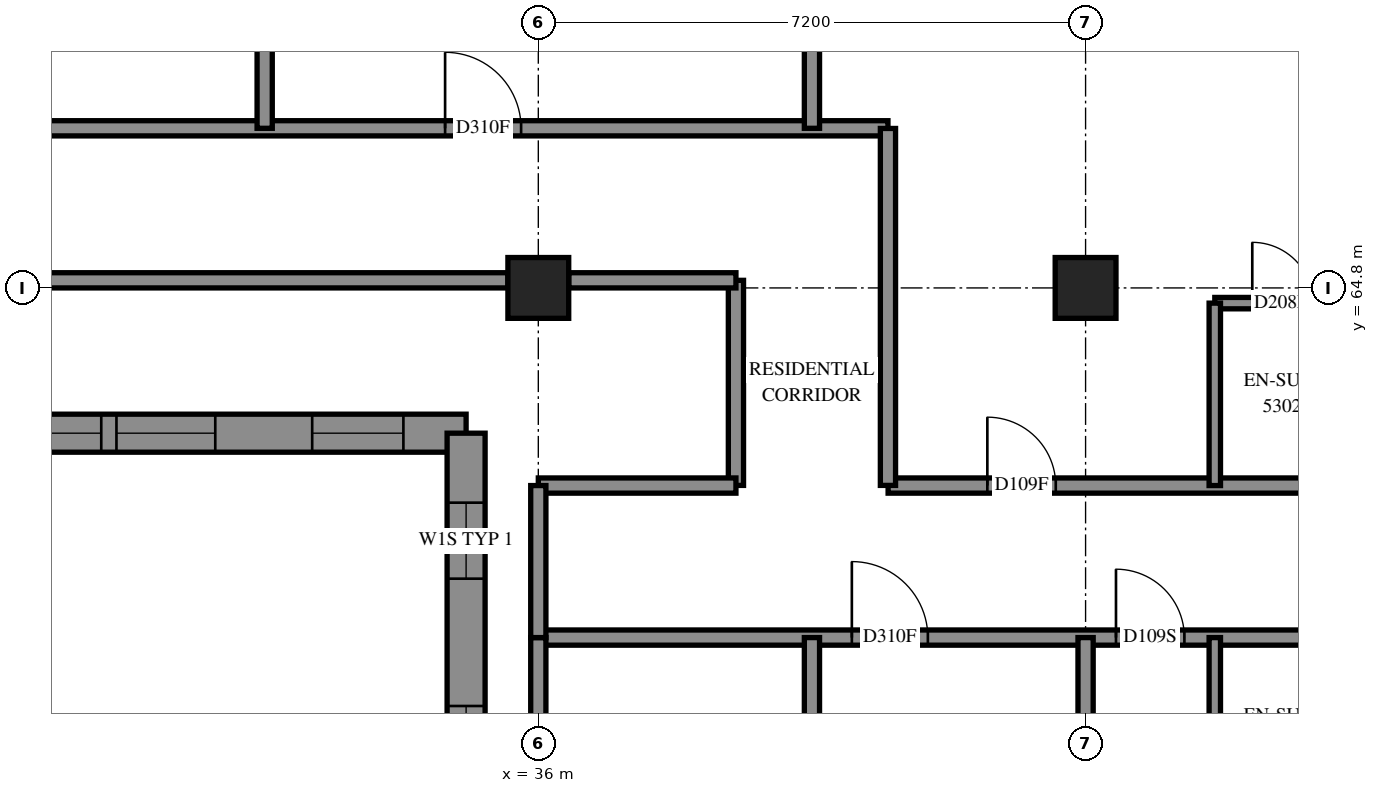
"""IFC4 building model, lengths in metres.
Left out: names, types, materials, properties, quantities, classifications, styles, units other than length and angle.
Written with IfcOpenShell. Run it as: python <this file> out.ifc"""

import sys

from ifc_helpers import new_model, si_unit, direction, frame, frame_2d, origin, origin_2d, place, context, subcontext, project, spatial, polyline, rectangle, outline, extrude, element, fill, save


model = new_model("IFC4")
c1 = context("Model", 3, precision=1e-05, world=origin(), true_north=direction((0.0, 1.0)))
c2 = subcontext(c1, "Body", "Model", "MODEL_VIEW")
j1 = project(units=[si_unit("LENGTHUNIT", "METRE"), si_unit("PLANEANGLEUNIT", "RADIAN")], contexts=[c1])
p1 = place(None, origin())
s1 = spatial("IfcSite", under=j1, at=p1, CompositionType="ELEMENT")
p2 = place(p1, origin())
s2 = spatial("IfcBuilding", under=s1, at=p2, CompositionType="ELEMENT")
p3 = place(p2, frame((0.0, 0.0, 196.4)))
s3 = spatial("IfcBuildingStorey", under=s2, at=p3, CompositionType="ELEMENT", Elevation=196.4)
for number, where, z_axis, x_axis in (
    (1, (36.0, 64.8, 0.0), (0.0, 0.0, 1.0), (1.0, 0.0, 0.0)),
    (2, (43.2, 64.8, 0.0), (0.0, 0.0, 1.0), (1.0, 0.0, 0.0)),
):
    element("IfcColumn", number, at=place(p3, frame(where, z_axis=z_axis, x_axis=x_axis)), inside=s3, PredefinedType="COLUMN", context=c2, shape_type="SweptSolid", body=[
        extrude(rectangle(XDim=0.8, YDim=0.8, at=origin_2d()), origin(), (0.0, 0.0, 1.0), 3.1),
    ])
p4 = place(p3, frame((19.689, 62.889, 0.0), z_axis=(0.0, 0.0, 1.0), x_axis=(1.0, 0.0, 0.0)))
e3 = element("IfcWall", 3, at=p4, inside=s3, PredefinedType="SOLIDWALL", context=c2, shape_type="SweptSolid", body=[
    extrude(outline(polyline([(-0.25, -0.25), (15.111, -0.25), (15.611, 0.25), (0.25, 0.25), (-0.25, -0.25)])), origin(), (0.0, 0.0, 1.0), 3.1),
])
p5 = place(p4, frame((2.311, 0.0, 0.45)))
e4 = element("IfcOpeningElement", 4, at=p5, cuts=e3, PredefinedType="OPENING", context=c2, shape_type="SweptSolid", body=[
    extrude(rectangle(XDim=1.3, YDim=2.5, at=frame_2d((0.65, 1.25))), frame((0.0, 0.26, 0.0), z_axis=(0.0, -1.0, 0.0), x_axis=(1.0, 0.0, 0.0)), (0.0, 0.0, 1.0), 0.52),
])
p6 = place(p4, frame((3.811, 0.0, 0.45)))
e5 = element("IfcOpeningElement", 5, at=p6, cuts=e3, PredefinedType="OPENING", context=c2, shape_type="SweptSolid", body=[
    extrude(rectangle(XDim=1.3, YDim=2.5, at=frame_2d((0.65, 1.25))), frame((0.0, 0.26, 0.0), z_axis=(0.0, -1.0, 0.0), x_axis=(1.0, 0.0, 0.0)), (0.0, 0.0, 1.0), 0.52),
])
p7 = place(p4, frame((5.911, 0.0, 0.45)))
e6 = element("IfcOpeningElement", 6, at=p7, cuts=e3, PredefinedType="OPENING", context=c2, shape_type="SweptSolid", body=[
    extrude(rectangle(XDim=1.3, YDim=2.5, at=frame_2d((0.65, 1.25))), frame((0.0, 0.26, 0.0), z_axis=(0.0, -1.0, 0.0), x_axis=(1.0, 0.0, 0.0)), (0.0, 0.0, 1.0), 0.52),
])
p8 = place(p4, frame((7.411, 0.0, 0.45)))
e7 = element("IfcOpeningElement", 7, at=p8, cuts=e3, PredefinedType="OPENING", context=c2, shape_type="SweptSolid", body=[
    extrude(rectangle(XDim=1.3, YDim=2.5, at=frame_2d((0.65, 1.25))), frame((0.0, 0.26, 0.0), z_axis=(0.0, -1.0, 0.0), x_axis=(1.0, 0.0, 0.0)), (0.0, 0.0, 1.0), 0.52),
])
p9 = place(p4, frame((9.261, 0.0, 0.45)))
e8 = element("IfcOpeningElement", 8, at=p9, cuts=e3, PredefinedType="OPENING", context=c2, shape_type="SweptSolid", body=[
    extrude(rectangle(XDim=1.3, YDim=2.5, at=frame_2d((0.65, 1.25))), frame((0.0, 0.26, 0.0), z_axis=(0.0, -1.0, 0.0), x_axis=(1.0, 0.0, 0.0)), (0.0, 0.0, 1.0), 0.52),
])
p10 = place(p4, frame((10.761, 0.0, 0.45)))
e9 = element("IfcOpeningElement", 9, at=p10, cuts=e3, PredefinedType="OPENING", context=c2, shape_type="SweptSolid", body=[
    extrude(rectangle(XDim=1.3, YDim=2.5, at=frame_2d((0.65, 1.25))), frame((0.0, 0.26, 0.0), z_axis=(0.0, -1.0, 0.0), x_axis=(1.0, 0.0, 0.0)), (0.0, 0.0, 1.0), 0.52),
])
p11 = place(p4, frame((0.581, 0.0, 0.45)))
e10 = element("IfcOpeningElement", 10, at=p11, cuts=e3, PredefinedType="OPENING", context=c2, shape_type="SweptSolid", body=[
    extrude(rectangle(XDim=1.2, YDim=2.5, at=frame_2d((0.6, 1.25))), frame((0.0, 0.26, 0.0), z_axis=(0.0, -1.0, 0.0), x_axis=(1.0, 0.0, 0.0)), (0.0, 0.0, 1.0), 0.52),
])
p12 = place(p4, frame((13.336, 0.0, 0.45)))
e11 = element("IfcOpeningElement", 11, at=p12, cuts=e3, PredefinedType="OPENING", context=c2, shape_type="SweptSolid", body=[
    extrude(rectangle(XDim=1.2, YDim=2.5, at=frame_2d((0.6, 1.25))), frame((0.0, 0.26, 0.0), z_axis=(0.0, -1.0, 0.0), x_axis=(1.0, 0.0, 0.0)), (0.0, 0.0, 1.0), 0.52),
])
p13 = place(p3, frame((35.05, 62.889, 0.0), z_axis=(0.0, 0.0, 1.0), x_axis=(0.0, -1.0, 0.0)))
e12 = element("IfcWall", 12, at=p13, inside=s3, PredefinedType="SOLIDWALL", context=c2, shape_type="SweptSolid", body=[
    extrude(outline(polyline([(0.25, -0.25), (6.489, -0.25), (5.989, 0.25), (-0.25, 0.25), (0.25, -0.25)])), origin(), (0.0, 0.0, 1.0), 3.1),
])
p14 = place(p13, frame((3.589, 0.0, 0.45)))
e13 = element("IfcOpeningElement", 13, at=p14, cuts=e12, PredefinedType="OPENING", context=c2, shape_type="SweptSolid", body=[
    extrude(rectangle(XDim=1.3, YDim=2.5, at=frame_2d((0.65, 1.25))), frame((0.0, 0.26, 0.0), z_axis=(0.0, -1.0, 0.0), x_axis=(1.0, 0.0, 0.0)), (0.0, 0.0, 1.0), 0.52),
])
p15 = place(p13, frame((0.914, 0.0, 0.45)))
e14 = element("IfcOpeningElement", 14, at=p15, cuts=e12, PredefinedType="OPENING", context=c2, shape_type="SweptSolid", body=[
    extrude(rectangle(XDim=1.0, YDim=2.5, at=frame_2d((0.5, 1.25))), frame((0.0, 0.26, 0.0), z_axis=(0.0, -1.0, 0.0), x_axis=(1.0, 0.0, 0.0)), (0.0, 0.0, 1.0), 0.52),
])
p16 = place(p3, frame((21.602, 66.9, 0.0), z_axis=(0.0, 0.0, 1.0), x_axis=(1.0, 0.0, 0.0)))
e15 = element("IfcWall", 15, at=p16, inside=s3, PredefinedType="PARTITIONING", context=c2, shape_type="SweptSolid", body=[
    extrude(rectangle(XDim=18.998, YDim=0.2, at=frame_2d((9.499, 0.0))), origin(), (0.0, 0.0, 1.0), 3.1),
])
p17 = place(p16, frame((5.972, 0.0, 0.0)))
e16 = element("IfcOpeningElement", 16, at=p17, cuts=e15, PredefinedType="OPENING", context=c2, shape_type="SweptSolid", body=[
    extrude(rectangle(XDim=1.0, YDim=2.1, at=frame_2d((0.5, 1.05))), frame((0.0, 0.11, 0.0), z_axis=(0.0, -1.0, 0.0), x_axis=(1.0, 0.0, 0.0)), (0.0, 0.0, 1.0), 0.22),
])
p18 = place(p16, frame((13.172, 0.0, 0.0)))
e17 = element("IfcOpeningElement", 17, at=p18, cuts=e15, PredefinedType="OPENING", context=c2, shape_type="SweptSolid", body=[
    extrude(rectangle(XDim=1.0, YDim=2.1, at=frame_2d((0.5, 1.05))), frame((0.0, 0.11, 0.0), z_axis=(0.0, -1.0, 0.0), x_axis=(1.0, 0.0, 0.0)), (0.0, 0.0, 1.0), 0.22),
])
p19 = place(p3, frame((36.0, 60.2, 0.0), z_axis=(0.0, 0.0, 1.0), x_axis=(1.0, 0.0, 0.0)))
e18 = element("IfcWall", 18, at=p19, inside=s3, PredefinedType="PARTITIONING", context=c2, shape_type="SweptSolid", body=[
    extrude(rectangle(XDim=17.0, YDim=0.2, at=frame_2d((8.5, 0.0))), origin(), (0.0, 0.0, 1.0), 3.1),
])
p20 = place(p19, frame((4.125, 0.0, 0.0)))
e19 = element("IfcOpeningElement", 19, at=p20, cuts=e18, PredefinedType="OPENING", context=c2, shape_type="SweptSolid", body=[
    extrude(rectangle(XDim=1.0, YDim=2.1, at=frame_2d((0.5, 1.05))), frame((0.0, 0.11, 0.0), z_axis=(0.0, -1.0, 0.0), x_axis=(1.0, 0.0, 0.0)), (0.0, 0.0, 1.0), 0.22),
])
p21 = place(p19, frame((7.6, 0.0, 0.0)))
e20 = element("IfcOpeningElement", 20, at=p21, cuts=e18, PredefinedType="OPENING", context=c2, shape_type="SweptSolid", body=[
    extrude(rectangle(XDim=0.9, YDim=2.1, at=frame_2d((0.45, 1.05))), frame((0.0, 0.11, 0.0), z_axis=(0.0, -1.0, 0.0), x_axis=(1.0, 0.0, 0.0)), (0.0, 0.0, 1.0), 0.22),
])
p22 = place(p19, frame((11.48, 0.0, 0.0)))
e21 = element("IfcOpeningElement", 21, at=p22, cuts=e18, PredefinedType="OPENING", context=c2, shape_type="SweptSolid", body=[
    extrude(rectangle(XDim=1.0, YDim=2.1, at=frame_2d((0.5, 1.05))), frame((0.0, 0.11, 0.0), z_axis=(0.0, -1.0, 0.0), x_axis=(1.0, 0.0, 0.0)), (0.0, 0.0, 1.0), 0.22),
])
p23 = place(p19, frame((15.805, 0.0, 0.0)))
e22 = element("IfcOpeningElement", 22, at=p23, cuts=e18, PredefinedType="OPENING", context=c2, shape_type="SweptSolid", body=[
    extrude(rectangle(XDim=1.0, YDim=2.1, at=frame_2d((0.5, 1.05))), frame((0.0, 0.11, 0.0), z_axis=(0.0, -1.0, 0.0), x_axis=(1.0, 0.0, 0.0)), (0.0, 0.0, 1.0), 0.22),
])
p24 = place(p3, frame((40.602, 62.2, 0.0), z_axis=(0.0, 0.0, 1.0), x_axis=(1.0, 0.0, 0.0)))
e23 = element("IfcWall", 23, at=p24, inside=s3, PredefinedType="PARTITIONING", context=c2, shape_type="SweptSolid", body=[
    extrude(rectangle(XDim=14.998, YDim=0.2, at=frame_2d((7.499, 0.0))), origin(), (0.0, 0.0, 1.0), 3.1),
])
p25 = place(p24, frame((1.306, 0.0, 0.0)))
e24 = element("IfcOpeningElement", 24, at=p25, cuts=e23, PredefinedType="OPENING", context=c2, shape_type="SweptSolid", body=[
    extrude(rectangle(XDim=0.9, YDim=2.1, at=frame_2d((0.45, 1.05))), frame((0.0, 0.11, 0.0), z_axis=(0.0, -1.0, 0.0), x_axis=(1.0, 0.0, 0.0)), (0.0, 0.0, 1.0), 0.22),
])
p26 = place(p24, frame((8.548, 0.0, 0.0)))
e25 = element("IfcOpeningElement", 25, at=p26, cuts=e23, PredefinedType="OPENING", context=c2, shape_type="SweptSolid", body=[
    extrude(rectangle(XDim=0.9, YDim=2.1, at=frame_2d((0.45, 1.05))), frame((0.0, 0.11, 0.0), z_axis=(0.0, -1.0, 0.0), x_axis=(1.0, 0.0, 0.0)), (0.0, 0.0, 1.0), 0.22),
])
p27 = place(p24, frame((10.198, 0.0, 0.0)))
e26 = element("IfcOpeningElement", 26, at=p27, cuts=e23, PredefinedType="OPENING", context=c2, shape_type="SweptSolid", body=[
    extrude(rectangle(XDim=0.9, YDim=2.1, at=frame_2d((0.45, 1.05))), frame((0.0, 0.11, 0.0), z_axis=(0.0, -1.0, 0.0), x_axis=(1.0, 0.0, 0.0)), (0.0, 0.0, 1.0), 0.22),
])
p28 = place(p24, frame((13.746, 0.0, 0.0)))
e27 = element("IfcOpeningElement", 27, at=p28, cuts=e23, PredefinedType="OPENING", context=c2, shape_type="SweptSolid", body=[
    extrude(rectangle(XDim=1.0, YDim=2.1, at=frame_2d((0.5, 1.05))), frame((0.0, 0.11, 0.0), z_axis=(0.0, -1.0, 0.0), x_axis=(1.0, 0.0, 0.0)), (0.0, 0.0, 1.0), 0.22),
])
p29 = place(p3, frame((29.2, 64.9, 0.0), z_axis=(0.0, 0.0, 1.0), x_axis=(1.0, 0.0, 0.0)))
e28 = element("IfcWall", 28, at=p29, inside=s3, PredefinedType="PARTITIONING", context=c2, shape_type="SweptSolid", body=[
    extrude(rectangle(XDim=6.4, YDim=0.2, at=frame_2d((3.2, 0.0))), origin(), (0.0, 0.0, 1.0), 2.6),
])
p30 = place(p3, frame((32.4, 66.9, 0.0), z_axis=(0.0, 0.0, 1.0), x_axis=(0.0, 1.0, 0.0)))
e29 = element("IfcWall", 29, at=p30, inside=s3, PredefinedType="PARTITIONING", context=c2, shape_type="SweptSolid", body=[
    extrude(rectangle(XDim=5.949, YDim=0.2, at=frame_2d((2.974, 0.0))), origin(), (0.0, 0.0, 1.0), 3.1),
])
p31 = place(p3, frame((39.6, 66.9, 0.0), z_axis=(0.0, 0.0, 1.0), x_axis=(0.0, 1.0, 0.0)))
e30 = element("IfcWall", 30, at=p31, inside=s3, PredefinedType="PARTITIONING", context=c2, shape_type="SweptSolid", body=[
    extrude(rectangle(XDim=5.913, YDim=0.2, at=frame_2d((2.956, 0.0))), origin(), (0.0, 0.0, 1.0), 3.1),
])
p32 = place(p3, frame((40.6, 62.202, 0.0), z_axis=(0.0, 0.0, 1.0), x_axis=(0.0, 1.0, 0.0)))
e31 = element("IfcWall", 31, at=p32, inside=s3, PredefinedType="PARTITIONING", context=c2, shape_type="SweptSolid", body=[
    extrude(rectangle(XDim=4.696, YDim=0.2, at=frame_2d((2.348, 0.0))), origin(), (0.0, 0.0, 1.0), 3.1),
])
p33 = place(p3, frame((44.9, 64.6, 0.0), z_axis=(0.0, 0.0, 1.0), x_axis=(1.0, 0.0, 0.0)))
e32 = element("IfcWall", 32, at=p33, inside=s3, PredefinedType="PARTITIONING", context=c2, shape_type="SweptSolid", body=[
    extrude(rectangle(XDim=3.8, YDim=0.15, at=frame_2d((1.9, 0.0))), origin(), (0.0, 0.0, 1.0), 3.1),
])
p34 = place(p33, frame((0.493, 0.0, 0.0)))
e33 = element("IfcOpeningElement", 33, at=p34, cuts=e32, PredefinedType="OPENING", context=c2, shape_type="SweptSolid", body=[
    extrude(rectangle(XDim=0.8, YDim=2.1, at=frame_2d((0.4, 1.05))), frame((0.0, 0.085, 0.0), z_axis=(0.0, -1.0, 0.0), x_axis=(1.0, 0.0, 0.0)), (0.0, 0.0, 1.0), 0.17),
])
p35 = place(p33, frame((2.507, 0.0, 0.0)))
e34 = element("IfcOpeningElement", 34, at=p35, cuts=e32, PredefinedType="OPENING", context=c2, shape_type="SweptSolid", body=[
    extrude(rectangle(XDim=0.8, YDim=2.1, at=frame_2d((0.4, 1.05))), frame((0.0, 0.085, 0.0), z_axis=(0.0, -1.0, 0.0), x_axis=(1.0, 0.0, 0.0)), (0.0, 0.0, 1.0), 0.17),
])
p36 = place(p3, frame((39.6, 56.9, 0.0), z_axis=(0.0, 0.0, 1.0), x_axis=(0.0, 1.0, 0.0)))
e35 = element("IfcWall", 35, at=p36, inside=s3, PredefinedType="PARTITIONING", context=c2, shape_type="SweptSolid", body=[
    extrude(rectangle(XDim=3.3, YDim=0.2, at=frame_2d((1.65, 0.0))), origin(), (0.0, 0.0, 1.0), 3.1),
])
p37 = place(p3, frame((38.6, 62.202, 0.0), z_axis=(0.0, 0.0, 1.0), x_axis=(0.0, 1.0, 0.0)))
e36 = element("IfcWall", 36, at=p37, inside=s3, PredefinedType="PARTITIONING", context=c2, shape_type="SweptSolid", body=[
    extrude(rectangle(XDim=2.698, YDim=0.2, at=frame_2d((1.349, 0.0))), origin(), (0.0, 0.0, 1.0), 3.1),
])
p38 = place(p3, frame((36.0, 62.2, 0.0), z_axis=(0.0, 0.0, 1.0), x_axis=(1.0, 0.0, 0.0)))
e37 = element("IfcWall", 37, at=p38, inside=s3, PredefinedType="PARTITIONING", context=c2, shape_type="SweptSolid", body=[
    extrude(rectangle(XDim=2.6, YDim=0.2, at=frame_2d((1.3, 0.0))), origin(), (0.0, 0.0, 1.0), 3.1),
])
for number, where, z_axis, x_axis in (
    (38, (44.9, 57.8, 0.0), (0.0, 0.0, 1.0), (0.0, 1.0, 0.0)),
    (39, (44.9, 62.2, 0.0), (0.0, 0.0, 1.0), (0.0, 1.0, 0.0)),
):
    element("IfcWall", number, at=place(p3, frame(where, z_axis=z_axis, x_axis=x_axis)), inside=s3, PredefinedType="PARTITIONING", context=c2, shape_type="SweptSolid", body=[
        extrude(rectangle(XDim=2.4, YDim=0.15, at=frame_2d((1.2, 0.0))), origin(), (0.0, 0.0, 1.0), 3.1),
    ])
p39 = place(p3, frame((36.4, 64.9, 0.0), z_axis=(0.0, 0.0, 1.0), x_axis=(1.0, 0.0, 0.0)))
e40 = element("IfcWall", 40, at=p39, inside=s3, PredefinedType="PARTITIONING", context=c2, shape_type="SweptSolid", body=[
    extrude(rectangle(XDim=2.2, YDim=0.2, at=frame_2d((1.1, 0.0))), origin(), (0.0, 0.0, 1.0), 3.1),
])
p40 = place(p3, frame((36.0, 58.0, 0.0), z_axis=(0.0, 0.0, 1.0), x_axis=(0.0, 1.0, 0.0)))
e41 = element("IfcWall", 41, at=p40, inside=s3, PredefinedType="PARTITIONING", context=c2, shape_type="SweptSolid", body=[
    extrude(rectangle(XDim=2.2, YDim=0.2, at=frame_2d((1.1, 0.0))), origin(), (0.0, 0.0, 1.0), 2.6),
])
p41 = place(p3, frame((43.2, 58.0, 0.0), z_axis=(0.0, 0.0, 1.0), x_axis=(0.0, 1.0, 0.0)))
e42 = element("IfcWall", 42, at=p41, inside=s3, PredefinedType="PARTITIONING", context=c2, shape_type="SweptSolid", body=[
    extrude(rectangle(XDim=2.2, YDim=0.2, at=frame_2d((1.1, 0.0))), origin(), (0.0, 0.0, 1.0), 3.1),
])
p42 = place(p3, frame((36.0, 60.2, 0.0), z_axis=(0.0, 0.0, 1.0), x_axis=(0.0, 1.0, 0.0)))
e43 = element("IfcWall", 43, at=p42, inside=s3, PredefinedType="PARTITIONING", context=c2, shape_type="SweptSolid", body=[
    extrude(rectangle(XDim=2.0, YDim=0.2, at=frame_2d((1.0, 0.0))), origin(), (0.0, 0.0, 1.0), 2.6),
])
p43 = place(p9, origin())
e44 = element("IfcWindow", 44, at=p43, inside=s3, PartitioningType="SINGLE_PANEL", PredefinedType="WINDOW", context=c2, shape_type="SweptSolid", body=[
    extrude(rectangle(XDim=1.3, YDim=2.5, at=frame_2d((0.65, 1.25))), frame((0.0, 0.18, 0.0), z_axis=(0.0, -1.0, 0.0), x_axis=(1.0, 0.0, 0.0)), (0.0, 0.0, 1.0), 0.06),
])
fill(e8, e44)
p44 = place(p10, origin())
e45 = element("IfcWindow", 45, at=p44, inside=s3, PartitioningType="SINGLE_PANEL", PredefinedType="WINDOW", context=c2, shape_type="SweptSolid", body=[
    extrude(rectangle(XDim=1.3, YDim=2.5, at=frame_2d((0.65, 1.25))), frame((0.0, 0.18, 0.0), z_axis=(0.0, -1.0, 0.0), x_axis=(1.0, 0.0, 0.0)), (0.0, 0.0, 1.0), 0.06),
])
fill(e9, e45)
p45 = place(p12, origin())
e46 = element("IfcWindow", 46, at=p45, inside=s3, PartitioningType="SINGLE_PANEL", PredefinedType="WINDOW", context=c2, shape_type="SweptSolid", body=[
    extrude(rectangle(XDim=1.2, YDim=2.5, at=frame_2d((0.6, 1.25))), frame((0.0, 0.18, 0.0), z_axis=(0.0, -1.0, 0.0), x_axis=(1.0, 0.0, 0.0)), (0.0, 0.0, 1.0), 0.06),
])
fill(e11, e46)
p46 = place(p14, origin())
e47 = element("IfcWindow", 47, at=p46, inside=s3, PartitioningType="SINGLE_PANEL", PredefinedType="WINDOW", context=c2, shape_type="SweptSolid", body=[
    extrude(rectangle(XDim=1.3, YDim=2.5, at=frame_2d((0.65, 1.25))), frame((0.0, 0.18, 0.0), z_axis=(0.0, -1.0, 0.0), x_axis=(1.0, 0.0, 0.0)), (0.0, 0.0, 1.0), 0.06),
])
fill(e13, e47)
p47 = place(p18, origin())
e48 = element("IfcDoor", 48, at=p47, inside=s3, OperationType="SINGLE_SWING_LEFT", PredefinedType="DOOR", context=c2, shape_type="SweptSolid", body=[
    extrude(rectangle(XDim=1.0, YDim=2.1, at=frame_2d((0.5, 1.05))), frame((0.0, 0.025, 0.0), z_axis=(0.0, -1.0, 0.0), x_axis=(1.0, 0.0, 0.0)), (0.0, 0.0, 1.0), 0.05),
])
fill(e17, e48)
p48 = place(p20, origin())
e49 = element("IfcDoor", 49, at=p48, inside=s3, OperationType="SINGLE_SWING_RIGHT", PredefinedType="DOOR", context=c2, shape_type="SweptSolid", body=[
    extrude(rectangle(XDim=1.0, YDim=2.1, at=frame_2d((0.5, 1.05))), frame((0.0, 0.025, 0.0), z_axis=(0.0, -1.0, 0.0), x_axis=(1.0, 0.0, 0.0)), (0.0, 0.0, 1.0), 0.05),
])
fill(e19, e49)
p49 = place(p21, origin())
e50 = element("IfcDoor", 50, at=p49, inside=s3, OperationType="SINGLE_SWING_LEFT", PredefinedType="DOOR", context=c2, shape_type="SweptSolid", body=[
    extrude(rectangle(XDim=0.9, YDim=2.1, at=frame_2d((0.45, 1.05))), frame((0.0, 0.025, 0.0), z_axis=(0.0, -1.0, 0.0), x_axis=(1.0, 0.0, 0.0)), (0.0, 0.0, 1.0), 0.05),
])
fill(e20, e50)
p50 = place(p25, origin())
e51 = element("IfcDoor", 51, at=p50, inside=s3, OperationType="SINGLE_SWING_LEFT", PredefinedType="DOOR", context=c2, shape_type="SweptSolid", body=[
    extrude(rectangle(XDim=0.9, YDim=2.1, at=frame_2d((0.45, 1.05))), frame((0.0, 0.025, 0.0), z_axis=(0.0, -1.0, 0.0), x_axis=(1.0, 0.0, 0.0)), (0.0, 0.0, 1.0), 0.05),
])
fill(e24, e51)
p51 = place(p34, origin())
e52 = element("IfcDoor", 52, at=p51, inside=s3, OperationType="SINGLE_SWING_RIGHT", PredefinedType="DOOR", context=c2, shape_type="SweptSolid", body=[
    extrude(rectangle(XDim=0.8, YDim=2.1, at=frame_2d((0.4, 1.05))), frame((0.0, 0.025, 0.0), z_axis=(0.0, -1.0, 0.0), x_axis=(1.0, 0.0, 0.0)), (0.0, 0.0, 1.0), 0.05),
])
fill(e33, e52)
p52 = place(p15, origin())
e53 = element("IfcWindow", 53, at=p52, inside=s3, PartitioningType="SINGLE_PANEL", PredefinedType="WINDOW", context=c2, shape_type="SweptSolid", body=[
    extrude(rectangle(XDim=1.0, YDim=2.5, at=frame_2d((0.5, 1.25))), frame((0.0, 0.18, 0.0), z_axis=(0.0, -1.0, 0.0), x_axis=(1.0, 0.0, 0.0)), (0.0, 0.0, 1.0), 0.06),
])
fill(e14, e53)
save(model, sys.argv[1])
